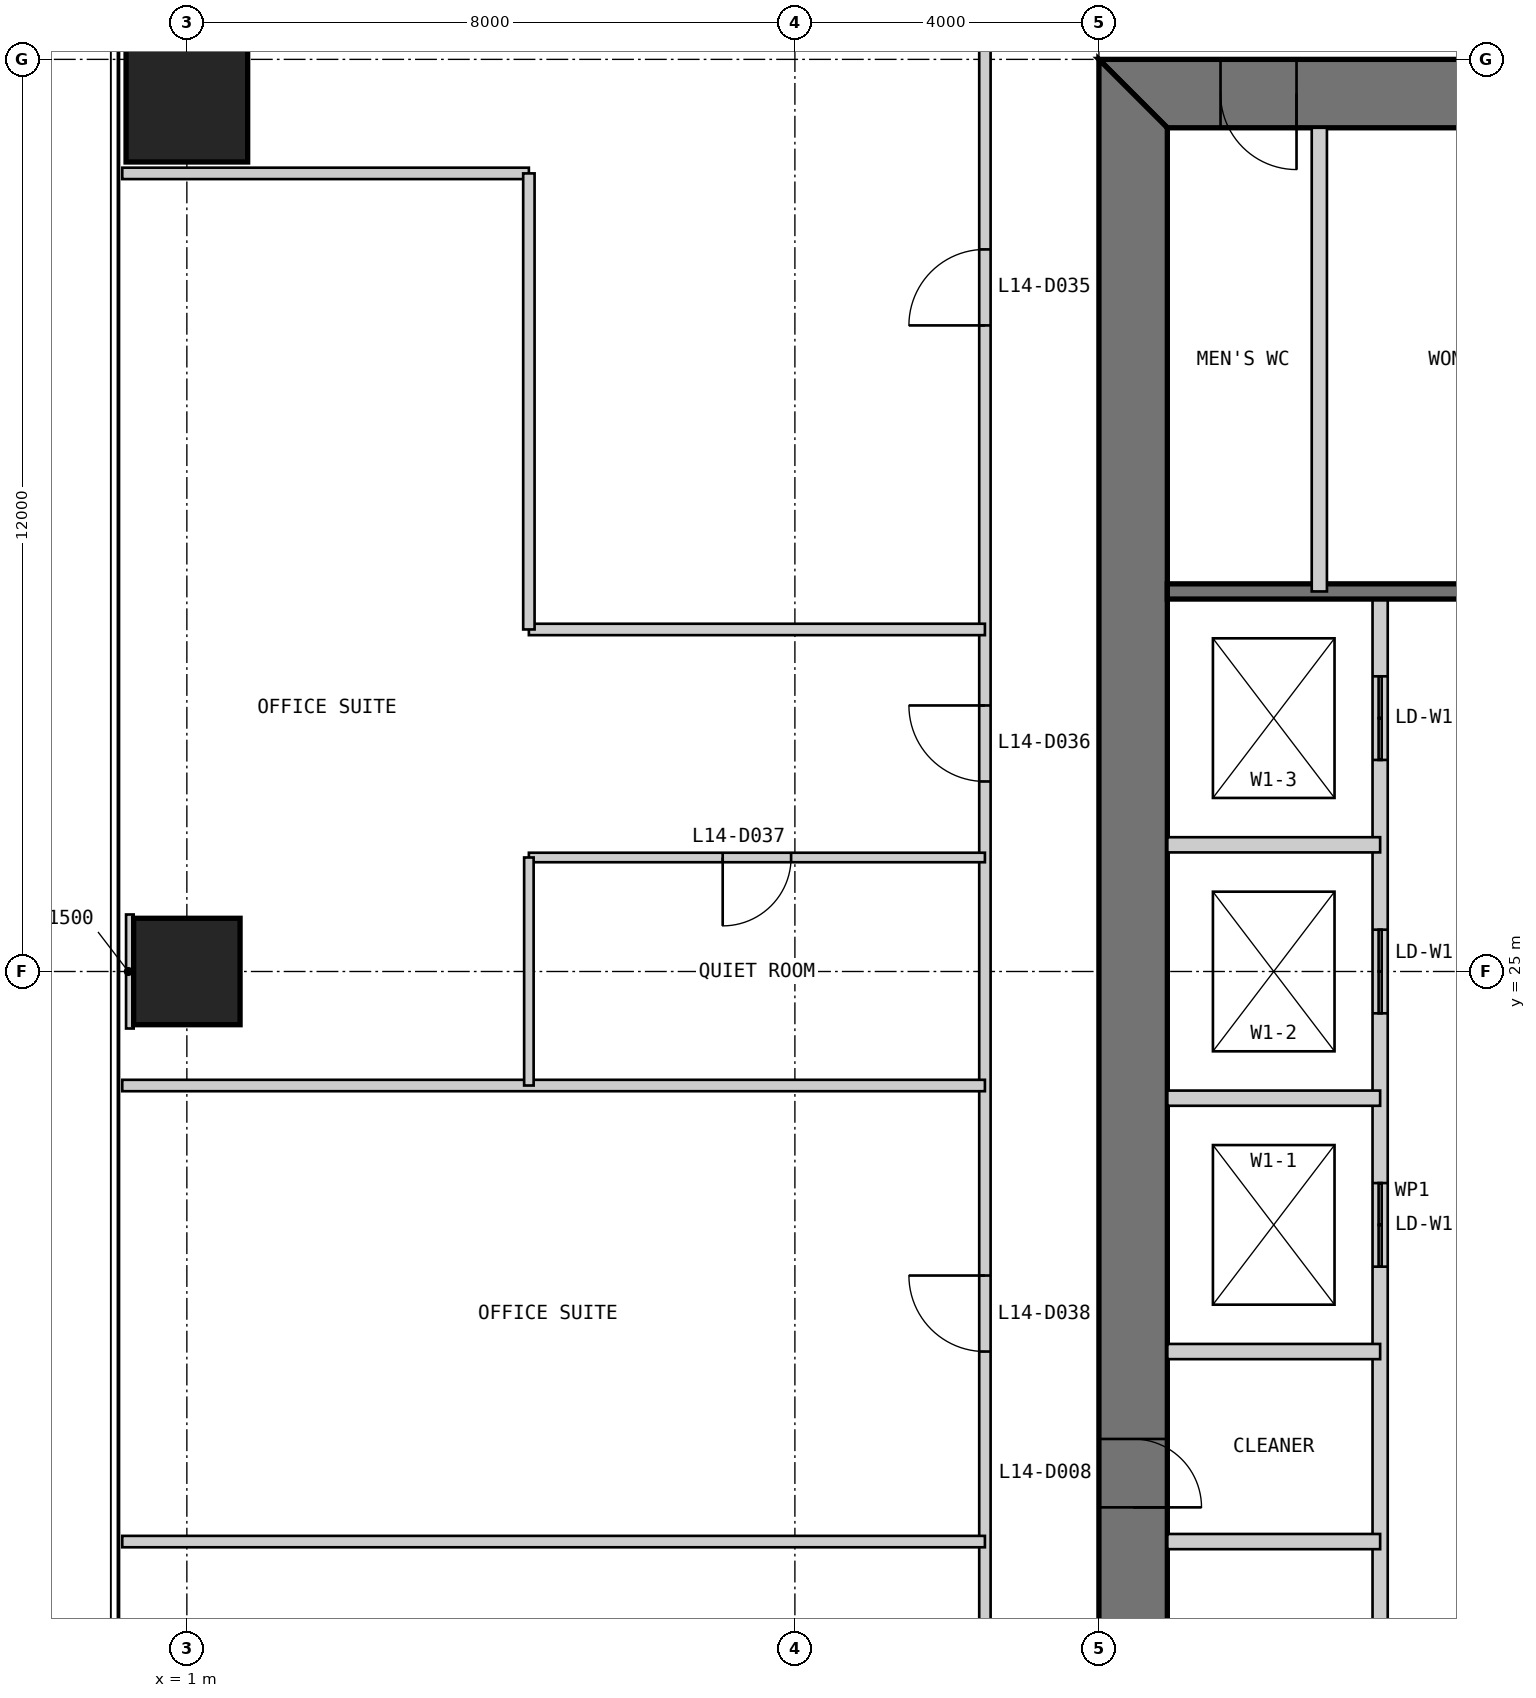
"""IFC4 building model, lengths in metres.
Left out: names, types, materials, properties, quantities, classifications, styles, units other than length and angle.
Written with IfcOpenShell. Run it as: python <this file> out.ifc"""

import sys

from ifc_helpers import new_model, si_unit, direction, frame, frame_2d, origin, origin_2d, place, context, subcontext, project, spatial, polyline, rectangle, outline, extrude, element, fill, save


model = new_model("IFC4")
c1 = context("Model", 3, precision=1e-05, world=origin(), true_north=direction((0.0, 1.0)))
c2 = subcontext(c1, "Body", "Model", "MODEL_VIEW")
j1 = project(units=[si_unit("LENGTHUNIT", "METRE"), si_unit("PLANEANGLEUNIT", "RADIAN")], contexts=[c1])
p1 = place(None, origin())
s1 = spatial("IfcSite", under=j1, at=p1, CompositionType="ELEMENT")
p2 = place(p1, origin())
s2 = spatial("IfcBuilding", under=s1, at=p2, CompositionType="ELEMENT")
p3 = place(p2, frame((0.0, 0.0, 63.0)))
s3 = spatial("IfcBuildingStorey", under=s2, at=p3, CompositionType="ELEMENT", Elevation=63.0)
p4 = place(p3, frame((1.0, 37.0, 0.0), z_axis=(0.0, 0.0, 1.0), x_axis=(1.0, 0.0, 0.0)))
e1 = element("IfcColumn", 1, at=p4, inside=s3, PredefinedType="COLUMN", context=c2, shape_type="SweptSolid", body=[
    extrude(rectangle(XDim=1.6, YDim=2.7, at=origin_2d()), origin(), (0.0, 0.0, 1.0), 4.0),
])
p5 = place(p3, frame((1.0, 25.0, 0.0), z_axis=(0.0, 0.0, 1.0), x_axis=(1.0, 0.0, 0.0)))
e2 = element("IfcColumn", 2, at=p5, inside=s3, PredefinedType="COLUMN", context=c2, shape_type="SweptSolid", body=[
    extrude(rectangle(XDim=1.4, YDim=1.4, at=origin_2d()), origin(), (0.0, 0.0, 1.0), 4.0),
])
p6 = place(p3, frame((37.0, 36.55, 0.0), z_axis=(0.0, 0.0, 1.0), x_axis=(-1.0, 0.0, 0.0)))
e3 = element("IfcWall", 3, at=p6, inside=s3, PredefinedType="SHEAR", context=c2, shape_type="SweptSolid", body=[
    extrude(outline(polyline([(0.0, -0.45), (24.0, -0.45), (23.1, 0.45), (0.9, 0.45), (0.0, -0.45)])), origin(), (0.0, 0.0, 1.0), 4.0),
])
p7 = place(p6, frame((4.9, 0.0, 0.0)))
e4 = element("IfcOpeningElement", 4, at=p7, cuts=e3, PredefinedType="OPENING", context=c2, shape_type="SweptSolid", body=[
    extrude(rectangle(XDim=1.0, YDim=2.2, at=frame_2d((0.5, 1.1))), frame((0.0, 0.46, 0.0), z_axis=(0.0, -1.0, 0.0), x_axis=(1.0, 0.0, 0.0)), (0.0, 0.0, 1.0), 0.92),
])
p8 = place(p6, frame((8.9, 0.0, 0.0)))
e5 = element("IfcOpeningElement", 5, at=p8, cuts=e3, PredefinedType="OPENING", context=c2, shape_type="SweptSolid", body=[
    extrude(rectangle(XDim=1.1, YDim=2.2, at=frame_2d((0.55, 1.1))), frame((0.0, 0.46, 0.0), z_axis=(0.0, -1.0, 0.0), x_axis=(1.0, 0.0, 0.0)), (0.0, 0.0, 1.0), 0.92),
])
p9 = place(p6, frame((15.05, 0.0, 0.0)))
e6 = element("IfcOpeningElement", 6, at=p9, cuts=e3, PredefinedType="OPENING", context=c2, shape_type="SweptSolid", body=[
    extrude(rectangle(XDim=0.9, YDim=2.2, at=frame_2d((0.45, 1.1))), frame((0.0, 0.46, 0.0), z_axis=(0.0, -1.0, 0.0), x_axis=(1.0, 0.0, 0.0)), (0.0, 0.0, 1.0), 0.92),
])
p10 = place(p6, frame((17.9, 0.0, 0.0)))
e7 = element("IfcOpeningElement", 7, at=p10, cuts=e3, PredefinedType="OPENING", context=c2, shape_type="SweptSolid", body=[
    extrude(rectangle(XDim=1.0, YDim=2.2, at=frame_2d((0.5, 1.1))), frame((0.0, 0.46, 0.0), z_axis=(0.0, -1.0, 0.0), x_axis=(1.0, 0.0, 0.0)), (0.0, 0.0, 1.0), 0.92),
])
p11 = place(p6, frame((21.4, 0.0, 0.0)))
e8 = element("IfcOpeningElement", 8, at=p11, cuts=e3, PredefinedType="OPENING", context=c2, shape_type="SweptSolid", body=[
    extrude(rectangle(XDim=1.0, YDim=2.2, at=frame_2d((0.5, 1.1))), frame((0.0, 0.46, 0.0), z_axis=(0.0, -1.0, 0.0), x_axis=(1.0, 0.0, 0.0)), (0.0, 0.0, 1.0), 0.92),
])
p12 = place(p3, frame((13.45, 36.1, 0.0), z_axis=(0.0, 0.0, 1.0), x_axis=(0.0, -1.0, 0.0)))
e9 = element("IfcWall", 9, at=p12, inside=s3, PredefinedType="SHEAR", context=c2, shape_type="SweptSolid", body=[
    extrude(outline(polyline([(-0.9, -0.45), (23.1, -0.45), (22.2, 0.45), (0.0, 0.45), (-0.9, -0.45)])), origin(), (0.0, 0.0, 1.0), 4.0),
])
p13 = place(p12, frame((20.2, 0.0, 0.0)))
e10 = element("IfcOpeningElement", 10, at=p13, cuts=e9, PredefinedType="OPENING", context=c2, shape_type="SweptSolid", body=[
    extrude(rectangle(XDim=1.0, YDim=2.2, at=frame_2d((0.5, 1.1))), frame((0.0, 0.46, 0.0), z_axis=(0.0, -1.0, 0.0), x_axis=(1.0, 0.0, 0.0)), (0.0, 0.0, 1.0), 0.92),
])
p14 = place(p12, frame((17.25, 0.0, 0.0)))
e11 = element("IfcOpeningElement", 11, at=p14, cuts=e9, PredefinedType="OPENING", context=c2, shape_type="SweptSolid", body=[
    extrude(rectangle(XDim=0.9, YDim=2.2, at=frame_2d((0.45, 1.1))), frame((0.0, 0.46, 0.0), z_axis=(0.0, -1.0, 0.0), x_axis=(1.0, 0.0, 0.0)), (0.0, 0.0, 1.0), 0.92),
])
p15 = place(p3, frame((16.7, 13.9, 0.0), z_axis=(0.0, 0.0, 1.0), x_axis=(0.0, 1.0, 0.0)))
e12 = element("IfcWall", 12, at=p15, inside=s3, PredefinedType="PARTITIONING", context=c2, shape_type="SweptSolid", body=[
    extrude(rectangle(XDim=16.1, YDim=0.2, at=frame_2d((8.05, 0.0))), origin(), (0.0, 0.0, 1.0), 3.8),
])
p16 = place(p15, frame((7.217, 0.0, 0.0)))
e13 = element("IfcOpeningElement", 13, at=p16, cuts=e12, PredefinedType="OPENING", context=c2, shape_type="SweptSolid", body=[
    extrude(rectangle(XDim=1.1, YDim=2.2, at=frame_2d((0.55, 1.1))), frame((0.0, 0.11, 0.0), z_axis=(0.0, -1.0, 0.0), x_axis=(1.0, 0.0, 0.0)), (0.0, 0.0, 1.0), 0.22),
])
p17 = place(p15, frame((10.55, 0.0, 0.0)))
e14 = element("IfcOpeningElement", 14, at=p17, cuts=e12, PredefinedType="OPENING", context=c2, shape_type="SweptSolid", body=[
    extrude(rectangle(XDim=1.1, YDim=2.2, at=frame_2d((0.55, 1.1))), frame((0.0, 0.11, 0.0), z_axis=(0.0, -1.0, 0.0), x_axis=(1.0, 0.0, 0.0)), (0.0, 0.0, 1.0), 0.22),
])
p18 = place(p15, frame((13.883, 0.0, 0.0)))
e15 = element("IfcOpeningElement", 15, at=p18, cuts=e12, PredefinedType="OPENING", context=c2, shape_type="SweptSolid", body=[
    extrude(rectangle(XDim=1.1, YDim=2.2, at=frame_2d((0.55, 1.1))), frame((0.0, 0.11, 0.0), z_axis=(0.0, -1.0, 0.0), x_axis=(1.0, 0.0, 0.0)), (0.0, 0.0, 1.0), 0.22),
])
for number, where, z_axis, x_axis in (
    (16, (13.9, 20.0, 0.0), (0.0, 0.0, 1.0), (1.0, 0.0, 0.0)),
    (17, (13.9, 23.333, 0.0), (0.0, 0.0, 1.0), (1.0, 0.0, 0.0)),
    (18, (13.9, 26.667, 0.0), (0.0, 0.0, 1.0), (1.0, 0.0, 0.0)),
    (19, (13.9, 17.5, 0.0), (0.0, 0.0, 1.0), (1.0, 0.0, 0.0)),
):
    element("IfcWall", number, at=place(p3, frame(where, z_axis=z_axis, x_axis=x_axis)), inside=s3, PredefinedType="PARTITIONING", context=c2, shape_type="SweptSolid", body=[
        extrude(rectangle(XDim=2.8, YDim=0.2, at=frame_2d((1.4, 0.0))), origin(), (0.0, 0.0, 1.0), 3.8),
    ])
p19 = place(p3, frame((29.7, 30.0, 0.0), z_axis=(0.0, 0.0, 1.0), x_axis=(-1.0, 0.0, 0.0)))
e20 = element("IfcWall", 20, at=p19, inside=s3, PredefinedType="SOLIDWALL", context=c2, shape_type="SweptSolid", body=[
    extrude(rectangle(XDim=15.8, YDim=0.2, at=frame_2d((7.9, 0.0))), origin(), (0.0, 0.0, 1.0), 3.8),
])
p20 = place(p3, frame((15.9, 36.1, 0.0), z_axis=(0.0, 0.0, 1.0), x_axis=(0.0, -1.0, 0.0)))
e21 = element("IfcWall", 21, at=p20, inside=s3, PredefinedType="PARTITIONING", context=c2, shape_type="SweptSolid", body=[
    extrude(rectangle(XDim=6.1, YDim=0.2, at=frame_2d((3.05, 0.0))), origin(), (0.0, 0.0, 1.0), 3.8),
])
p21 = place(p3, frame((11.5, 38.5, 0.0), z_axis=(0.0, 0.0, 1.0), x_axis=(0.0, -1.0, 0.0)))
e22 = element("IfcWall", 22, at=p21, inside=s3, PredefinedType="PARTITIONING", context=c2, shape_type="SweptSolid", body=[
    extrude(rectangle(XDim=27.0, YDim=0.15, at=frame_2d((13.5, 0.0))), origin(), (0.0, 0.0, 1.0), 3.85),
])
p22 = place(p21, frame((4.0, 0.0, 0.0)))
e23 = element("IfcOpeningElement", 23, at=p22, cuts=e22, PredefinedType="OPENING", context=c2, shape_type="SweptSolid", body=[
    extrude(rectangle(XDim=1.0, YDim=2.2, at=frame_2d((0.5, 1.1))), frame((0.0, 0.085, 0.0), z_axis=(0.0, -1.0, 0.0), x_axis=(1.0, 0.0, 0.0)), (0.0, 0.0, 1.0), 0.17),
])
p23 = place(p21, frame((10.0, 0.0, 0.0)))
e24 = element("IfcOpeningElement", 24, at=p23, cuts=e22, PredefinedType="OPENING", context=c2, shape_type="SweptSolid", body=[
    extrude(rectangle(XDim=1.0, YDim=2.2, at=frame_2d((0.5, 1.1))), frame((0.0, 0.085, 0.0), z_axis=(0.0, -1.0, 0.0), x_axis=(1.0, 0.0, 0.0)), (0.0, 0.0, 1.0), 0.17),
])
p24 = place(p21, frame((17.5, 0.0, 0.0)))
e25 = element("IfcOpeningElement", 25, at=p24, cuts=e22, PredefinedType="OPENING", context=c2, shape_type="SweptSolid", body=[
    extrude(rectangle(XDim=1.0, YDim=2.2, at=frame_2d((0.5, 1.1))), frame((0.0, 0.085, 0.0), z_axis=(0.0, -1.0, 0.0), x_axis=(1.0, 0.0, 0.0)), (0.0, 0.0, 1.0), 0.17),
])
p25 = place(p21, frame((23.5, 0.0, 0.0)))
e26 = element("IfcOpeningElement", 26, at=p25, cuts=e22, PredefinedType="OPENING", context=c2, shape_type="SweptSolid", body=[
    extrude(rectangle(XDim=1.0, YDim=2.2, at=frame_2d((0.5, 1.1))), frame((0.0, 0.085, 0.0), z_axis=(0.0, -1.0, 0.0), x_axis=(1.0, 0.0, 0.0)), (0.0, 0.0, 1.0), 0.17),
])
p26 = place(p3, frame((0.15, 35.5, 0.0), z_axis=(0.0, 0.0, 1.0), x_axis=(1.0, 0.0, 0.0)))
e27 = element("IfcWall", 27, at=p26, inside=s3, PredefinedType="PARTITIONING", context=c2, shape_type="SweptSolid", body=[
    extrude(rectangle(XDim=5.35, YDim=0.15, at=frame_2d((2.675, 0.0))), origin(), (0.0, 0.0, 1.0), 3.85),
])
p27 = place(p3, frame((5.5, 29.5, 0.0), z_axis=(0.0, 0.0, 1.0), x_axis=(1.0, 0.0, 0.0)))
e28 = element("IfcWall", 28, at=p27, inside=s3, PredefinedType="PARTITIONING", context=c2, shape_type="SweptSolid", body=[
    extrude(rectangle(XDim=6.0, YDim=0.15, at=frame_2d((3.0, 0.0))), origin(), (0.0, 0.0, 1.0), 3.85),
])
p28 = place(p3, frame((5.5, 26.5, 0.0), z_axis=(0.0, 0.0, 1.0), x_axis=(1.0, 0.0, 0.0)))
e29 = element("IfcWall", 29, at=p28, inside=s3, PredefinedType="PARTITIONING", context=c2, shape_type="SweptSolid", body=[
    extrude(rectangle(XDim=6.0, YDim=0.125, at=frame_2d((3.0, 0.0))), origin(), (0.0, 0.0, 1.0), 3.85),
])
p29 = place(p28, frame((2.55, 0.0, 0.0)))
e30 = element("IfcOpeningElement", 30, at=p29, cuts=e29, PredefinedType="OPENING", context=c2, shape_type="SweptSolid", body=[
    extrude(rectangle(XDim=0.9, YDim=2.2, at=frame_2d((0.45, 1.1))), frame((0.0, 0.073, 0.0), z_axis=(0.0, -1.0, 0.0), x_axis=(1.0, 0.0, 0.0)), (0.0, 0.0, 1.0), 0.145),
])
for number, where, z_axis, x_axis in (
    (31, (0.15, 23.5, 0.0), (0.0, 0.0, 1.0), (1.0, 0.0, 0.0)),
    (32, (0.15, 17.5, 0.0), (0.0, 0.0, 1.0), (1.0, 0.0, 0.0)),
):
    element("IfcWall", number, at=place(p3, frame(where, z_axis=z_axis, x_axis=x_axis)), inside=s3, PredefinedType="PARTITIONING", context=c2, shape_type="SweptSolid", body=[
        extrude(rectangle(XDim=11.35, YDim=0.15, at=frame_2d((5.675, 0.0))), origin(), (0.0, 0.0, 1.0), 3.85),
    ])
p30 = place(p3, frame((5.5, 35.5, 0.0), z_axis=(0.0, 0.0, 1.0), x_axis=(0.0, -1.0, 0.0)))
e33 = element("IfcWall", 33, at=p30, inside=s3, PredefinedType="PARTITIONING", context=c2, shape_type="SweptSolid", body=[
    extrude(rectangle(XDim=6.0, YDim=0.15, at=frame_2d((3.0, 0.0))), origin(), (0.0, 0.0, 1.0), 3.85),
])
p31 = place(p3, frame((5.5, 26.5, 0.0), z_axis=(0.0, 0.0, 1.0), x_axis=(0.0, -1.0, 0.0)))
e34 = element("IfcWall", 34, at=p31, inside=s3, PredefinedType="PARTITIONING", context=c2, shape_type="SweptSolid", body=[
    extrude(rectangle(XDim=3.0, YDim=0.125, at=frame_2d((1.5, 0.0))), origin(), (0.0, 0.0, 1.0), 3.85),
])
p32 = place(p3, frame((0.2, 25.0, 0.0), z_axis=(0.0, 0.0, 1.0), x_axis=(1.0, 0.0, 0.0)))
e35 = element("IfcWall", 35, at=p32, inside=s3, PredefinedType="PARTITIONING", context=c2, shape_type="SweptSolid", body=[
    extrude(rectangle(XDim=0.1, YDim=1.5, at=frame_2d((0.05, 0.0))), origin(), (0.0, 0.0, 1.0), 3.85),
])
p33 = place(p14, origin())
e36 = element("IfcDoor", 36, at=p33, inside=s3, OperationType="SINGLE_SWING_RIGHT", PredefinedType="DOOR", context=c2, shape_type="SweptSolid", body=[
    extrude(rectangle(XDim=0.9, YDim=2.2, at=frame_2d((0.45, 1.1))), frame((0.0, 0.025, 0.0), z_axis=(0.0, -1.0, 0.0), x_axis=(1.0, 0.0, 0.0)), (0.0, 0.0, 1.0), 0.05),
    extrude(outline(polyline([(0.0, 0.0), (0.04, 0.0), (0.04, 2.16), (0.86, 2.16), (0.86, 0.0), (0.9, 0.0), (0.9, 2.2), (0.0, 2.2), (0.0, 0.0)])), frame((0.0, 0.3, 0.0), z_axis=(0.0, -1.0, 0.0), x_axis=(1.0, 0.0, 0.0)), (0.0, 0.0, 1.0), 0.6),
])
fill(e11, e36)
p34 = place(p11, origin())
e37 = element("IfcDoor", 37, at=p34, inside=s3, OperationType="SINGLE_SWING_LEFT", PredefinedType="DOOR", context=c2, shape_type="SweptSolid", body=[
    extrude(rectangle(XDim=1.0, YDim=2.2, at=frame_2d((0.5, 1.1))), frame((0.0, 0.025, 0.0), z_axis=(0.0, -1.0, 0.0), x_axis=(1.0, 0.0, 0.0)), (0.0, 0.0, 1.0), 0.05),
    extrude(outline(polyline([(0.0, 0.0), (0.04, 0.0), (0.04, 2.16), (0.96, 2.16), (0.96, 0.0), (1.0, 0.0), (1.0, 2.2), (0.0, 2.2), (0.0, 0.0)])), frame((0.0, 0.3, 0.0), z_axis=(0.0, -1.0, 0.0), x_axis=(1.0, 0.0, 0.0)), (0.0, 0.0, 1.0), 0.6),
])
fill(e8, e37)
p35 = place(p22, frame((1.0, 0.0, 0.0), z_axis=(0.0, 0.0, 1.0), x_axis=(-1.0, 0.0, 0.0)))
e38 = element("IfcDoor", 38, at=p35, inside=s3, OperationType="SINGLE_SWING_LEFT", PredefinedType="DOOR", context=c2, shape_type="SweptSolid", body=[
    extrude(rectangle(XDim=1.0, YDim=2.2, at=frame_2d((0.5, 1.1))), frame((0.0, 0.025, 0.0), z_axis=(0.0, -1.0, 0.0), x_axis=(1.0, 0.0, 0.0)), (0.0, 0.0, 1.0), 0.05),
])
fill(e23, e38)
p36 = place(p23, frame((1.0, 0.0, 0.0), z_axis=(0.0, 0.0, 1.0), x_axis=(-1.0, 0.0, 0.0)))
e39 = element("IfcDoor", 39, at=p36, inside=s3, OperationType="SINGLE_SWING_RIGHT", PredefinedType="DOOR", context=c2, shape_type="SweptSolid", body=[
    extrude(rectangle(XDim=1.0, YDim=2.2, at=frame_2d((0.5, 1.1))), frame((0.0, 0.025, 0.0), z_axis=(0.0, -1.0, 0.0), x_axis=(1.0, 0.0, 0.0)), (0.0, 0.0, 1.0), 0.05),
])
fill(e24, e39)
p37 = place(p29, frame((0.9, 0.0, 0.0), z_axis=(0.0, 0.0, 1.0), x_axis=(-1.0, 0.0, 0.0)))
e40 = element("IfcDoor", 40, at=p37, inside=s3, OperationType="SINGLE_SWING_RIGHT", PredefinedType="DOOR", context=c2, shape_type="SweptSolid", body=[
    extrude(rectangle(XDim=0.9, YDim=2.2, at=frame_2d((0.45, 1.1))), frame((0.0, 0.025, 0.0), z_axis=(0.0, -1.0, 0.0), x_axis=(1.0, 0.0, 0.0)), (0.0, 0.0, 1.0), 0.05),
])
fill(e30, e40)
p38 = place(p24, frame((1.0, 0.0, 0.0), z_axis=(0.0, 0.0, 1.0), x_axis=(-1.0, 0.0, 0.0)))
e41 = element("IfcDoor", 41, at=p38, inside=s3, OperationType="SINGLE_SWING_RIGHT", PredefinedType="DOOR", context=c2, shape_type="SweptSolid", body=[
    extrude(rectangle(XDim=1.0, YDim=2.2, at=frame_2d((0.5, 1.1))), frame((0.0, 0.025, 0.0), z_axis=(0.0, -1.0, 0.0), x_axis=(1.0, 0.0, 0.0)), (0.0, 0.0, 1.0), 0.05),
])
fill(e25, e41)
p39 = place(p16, origin())
e42 = element("IfcDoor", 42, at=p39, inside=s3, OperationType="DOUBLE_DOOR_SLIDING", PredefinedType="DOOR", context=c2, shape_type="SweptSolid", body=[
    extrude(rectangle(XDim=1.1, YDim=2.2, at=frame_2d((0.55, 1.1))), frame((0.0, 0.025, 0.0), z_axis=(0.0, -1.0, 0.0), x_axis=(1.0, 0.0, 0.0)), (0.0, 0.0, 1.0), 0.05),
])
fill(e13, e42)
p40 = place(p17, origin())
e43 = element("IfcDoor", 43, at=p40, inside=s3, OperationType="DOUBLE_DOOR_SLIDING", PredefinedType="DOOR", context=c2, shape_type="SweptSolid", body=[
    extrude(rectangle(XDim=1.1, YDim=2.2, at=frame_2d((0.55, 1.1))), frame((0.0, 0.025, 0.0), z_axis=(0.0, -1.0, 0.0), x_axis=(1.0, 0.0, 0.0)), (0.0, 0.0, 1.0), 0.05),
])
fill(e14, e43)
p41 = place(p18, origin())
e44 = element("IfcDoor", 44, at=p41, inside=s3, OperationType="DOUBLE_DOOR_SLIDING", PredefinedType="DOOR", context=c2, shape_type="SweptSolid", body=[
    extrude(rectangle(XDim=1.1, YDim=2.2, at=frame_2d((0.55, 1.1))), frame((0.0, 0.025, 0.0), z_axis=(0.0, -1.0, 0.0), x_axis=(1.0, 0.0, 0.0)), (0.0, 0.0, 1.0), 0.05),
])
fill(e15, e44)
save(model, sys.argv[1])
